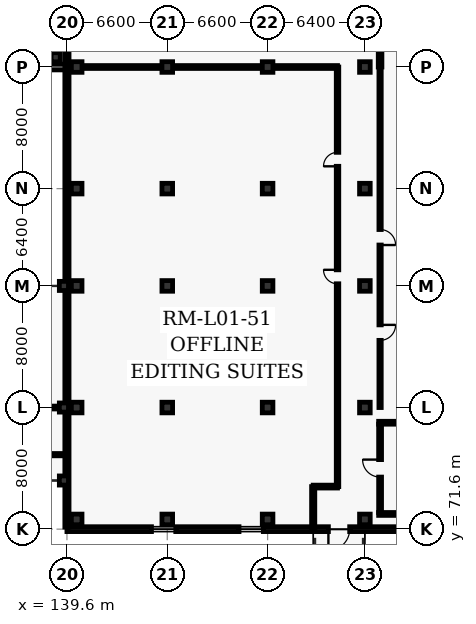
"""IFC4 building model, lengths in metres.
Left out: names, types, materials, properties, quantities, classifications, styles, units other than length and angle.
Written with IfcOpenShell. Run it as: python <this file> out.ifc"""

import sys

from ifc_helpers import new_model, si_unit, direction, frame, frame_2d, origin, origin_2d, place, context, subcontext, project, spatial, rectangle, extrude, element, fill, save


model = new_model("IFC4")
c1 = context("Model", 3, precision=1e-05, world=origin(), true_north=direction((0.0, 1.0)))
c2 = subcontext(c1, "Body", "Model", "MODEL_VIEW")
j1 = project(units=[si_unit("LENGTHUNIT", "METRE"), si_unit("PLANEANGLEUNIT", "RADIAN")], contexts=[c1])
p1 = place(None, origin())
s1 = spatial("IfcSite", under=j1, at=p1, CompositionType="ELEMENT")
p2 = place(p1, origin())
s2 = spatial("IfcBuilding", under=s1, at=p2, CompositionType="ELEMENT")
p3 = place(p2, frame((0.0, 0.0, 5.4)))
s3 = spatial("IfcBuildingStorey", under=s2, at=p3, CompositionType="ELEMENT", Elevation=5.4)
for number, where, z_axis, x_axis in (
    (1, (138.86, 102.64, 0.0), (0.0, 0.0, 1.0), (1.0, 0.0, 0.0)),
    (2, (139.4, 74.8, 0.0), (0.0, 0.0, 1.0), (1.0, 0.0, 0.0)),
    (3, (139.4, 79.6, 0.0), (0.0, 0.0, 1.0), (1.0, 0.0, 0.0)),
    (4, (139.4, 87.6, 0.0), (0.0, 0.0, 1.0), (1.0, 0.0, 0.0)),
):
    element("IfcColumn", number, at=place(p3, frame(where, z_axis=z_axis, x_axis=x_axis)), inside=s3, PredefinedType="COLUMN", context=c2, shape_type="SweptSolid", body=[
        extrude(rectangle(XDim=0.6, YDim=0.6, at=origin_2d()), origin(), (0.0, 0.0, 1.0), 4.8),
    ])
for number, where, z_axis, x_axis in (
    (5, (140.24, 72.24, 0.0), (0.0, 0.0, 1.0), (1.0, 0.0, 0.0)),
    (6, (140.24, 79.6, 0.0), (0.0, 0.0, 1.0), (1.0, 0.0, 0.0)),
    (7, (140.24, 87.6, 0.0), (0.0, 0.0, 1.0), (1.0, 0.0, 0.0)),
    (8, (140.24, 94.0, 0.0), (0.0, 0.0, 1.0), (1.0, 0.0, 0.0)),
    (9, (140.24, 102.0, 0.0), (0.0, 0.0, 1.0), (1.0, 0.0, 0.0)),
    (10, (146.2, 72.24, 0.0), (0.0, 0.0, 1.0), (1.0, 0.0, 0.0)),
    (11, (146.2, 79.6, 0.0), (0.0, 0.0, 1.0), (1.0, 0.0, 0.0)),
    (12, (146.2, 87.6, 0.0), (0.0, 0.0, 1.0), (1.0, 0.0, 0.0)),
    (13, (146.2, 94.0, 0.0), (0.0, 0.0, 1.0), (1.0, 0.0, 0.0)),
    (14, (146.2, 102.0, 0.0), (0.0, 0.0, 1.0), (1.0, 0.0, 0.0)),
    (15, (152.8, 72.24, 0.0), (0.0, 0.0, 1.0), (1.0, 0.0, 0.0)),
    (16, (152.8, 79.6, 0.0), (0.0, 0.0, 1.0), (1.0, 0.0, 0.0)),
    (17, (152.8, 87.6, 0.0), (0.0, 0.0, 1.0), (1.0, 0.0, 0.0)),
    (18, (152.8, 94.0, 0.0), (0.0, 0.0, 1.0), (1.0, 0.0, 0.0)),
    (19, (152.8, 102.0, 0.0), (0.0, 0.0, 1.0), (1.0, 0.0, 0.0)),
    (20, (159.2, 72.24, 0.0), (0.0, 0.0, 1.0), (1.0, 0.0, 0.0)),
    (21, (159.2, 79.6, 0.0), (0.0, 0.0, 1.0), (1.0, 0.0, 0.0)),
    (22, (159.2, 87.6, 0.0), (0.0, 0.0, 1.0), (1.0, 0.0, 0.0)),
    (23, (159.2, 94.0, 0.0), (0.0, 0.0, 1.0), (1.0, 0.0, 0.0)),
    (24, (159.2, 102.0, 0.0), (0.0, 0.0, 1.0), (1.0, 0.0, 0.0)),
):
    element("IfcColumn", number, at=place(p3, frame(where, z_axis=z_axis, x_axis=x_axis)), inside=s3, PredefinedType="COLUMN", context=c2, shape_type="SweptSolid", body=[
        extrude(rectangle(XDim=0.7, YDim=0.7, at=origin_2d()), origin(), (0.0, 0.0, 1.0), 4.8),
    ])
p4 = place(p3, frame((139.5, 102.0, 0.0), z_axis=(0.0, 0.0, 1.0), x_axis=(-1.0, 0.0, 0.0)))
e25 = element("IfcWall", 25, at=p4, inside=s3, PredefinedType="SOLIDWALL", context=c2, shape_type="SweptSolid", body=[
    extrude(rectangle(XDim=44.7, YDim=0.38, at=frame_2d((22.35, 0.0))), origin(), (0.0, 0.0, 1.0), 4.54),
])
p5 = place(p4, frame((2.2, 0.0, 0.9)))
e26 = element("IfcOpeningElement", 26, at=p5, cuts=e25, PredefinedType="OPENING", context=c2, shape_type="SweptSolid", body=[
    extrude(rectangle(XDim=2.6, YDim=2.35, at=frame_2d((1.3, 1.175))), frame((0.0, 0.2, 0.0), z_axis=(0.0, -1.0, 0.0), x_axis=(1.0, 0.0, 0.0)), (0.0, 0.0, 1.0), 0.4),
])
p6 = place(p4, frame((9.05, 0.0, 0.9)))
e27 = element("IfcOpeningElement", 27, at=p6, cuts=e25, PredefinedType="OPENING", context=c2, shape_type="SweptSolid", body=[
    extrude(rectangle(XDim=2.7, YDim=2.35, at=frame_2d((1.35, 1.175))), frame((0.0, 0.2, 0.0), z_axis=(0.0, -1.0, 0.0), x_axis=(1.0, 0.0, 0.0)), (0.0, 0.0, 1.0), 0.4),
])
p7 = place(p4, frame((15.9, 0.0, 0.9)))
e28 = element("IfcOpeningElement", 28, at=p7, cuts=e25, PredefinedType="OPENING", context=c2, shape_type="SweptSolid", body=[
    extrude(rectangle(XDim=2.8, YDim=2.4, at=frame_2d((1.4, 1.2))), frame((0.0, 0.2, 0.0), z_axis=(0.0, -1.0, 0.0), x_axis=(1.0, 0.0, 0.0)), (0.0, 0.0, 1.0), 0.4),
])
p8 = place(p4, frame((22.75, 0.0, 0.9)))
e29 = element("IfcOpeningElement", 29, at=p8, cuts=e25, PredefinedType="OPENING", context=c2, shape_type="SweptSolid", body=[
    extrude(rectangle(XDim=2.9, YDim=2.4, at=frame_2d((1.45, 1.2))), frame((0.0, 0.2, 0.0), z_axis=(0.0, -1.0, 0.0), x_axis=(1.0, 0.0, 0.0)), (0.0, 0.0, 1.0), 0.4),
])
p9 = place(p4, frame((29.6, 0.0, 0.9)))
e30 = element("IfcOpeningElement", 30, at=p9, cuts=e25, PredefinedType="OPENING", context=c2, shape_type="SweptSolid", body=[
    extrude(rectangle(XDim=3.0, YDim=2.45, at=frame_2d((1.5, 1.225))), frame((0.0, 0.2, 0.0), z_axis=(0.0, -1.0, 0.0), x_axis=(1.0, 0.0, 0.0)), (0.0, 0.0, 1.0), 0.4),
])
p10 = place(p4, frame((36.45, 0.0, 0.9)))
e31 = element("IfcOpeningElement", 31, at=p10, cuts=e25, PredefinedType="OPENING", context=c2, shape_type="SweptSolid", body=[
    extrude(rectangle(XDim=3.1, YDim=2.45, at=frame_2d((1.55, 1.225))), frame((0.0, 0.2, 0.0), z_axis=(0.0, -1.0, 0.0), x_axis=(1.0, 0.0, 0.0)), (0.0, 0.0, 1.0), 0.4),
])
p11 = place(p3, frame((172.0, 71.6, 0.0), z_axis=(0.0, 0.0, 1.0), x_axis=(-1.0, 0.0, 0.0)))
e32 = element("IfcWall", 32, at=p11, inside=s3, PredefinedType="SOLIDWALL", context=c2, shape_type="SweptSolid", body=[
    extrude(rectangle(XDim=32.4, YDim=0.32, at=frame_2d((16.2, 0.0))), origin(), (0.0, 0.0, 1.0), 3.85),
])
p12 = place(p11, frame((7.96, 0.0, 0.8)))
e33 = element("IfcOpeningElement", 33, at=p12, cuts=e32, PredefinedType="OPENING", context=c2, shape_type="SweptSolid", body=[
    extrude(rectangle(XDim=1.6, YDim=1.65, at=frame_2d((0.8, 0.825))), frame((0.0, 0.17, 0.0), z_axis=(0.0, -1.0, 0.0), x_axis=(1.0, 0.0, 0.0)), (0.0, 0.0, 1.0), 0.34),
])
p13 = place(p11, frame((19.48, 0.0, 0.8)))
e34 = element("IfcOpeningElement", 34, at=p13, cuts=e32, PredefinedType="OPENING", context=c2, shape_type="SweptSolid", body=[
    extrude(rectangle(XDim=1.6, YDim=1.65, at=frame_2d((0.8, 0.825))), frame((0.0, 0.17, 0.0), z_axis=(0.0, -1.0, 0.0), x_axis=(1.0, 0.0, 0.0)), (0.0, 0.0, 1.0), 0.34),
])
p14 = place(p11, frame((25.24, 0.0, 0.8)))
e35 = element("IfcOpeningElement", 35, at=p14, cuts=e32, PredefinedType="OPENING", context=c2, shape_type="SweptSolid", body=[
    extrude(rectangle(XDim=1.6, YDim=1.65, at=frame_2d((0.8, 0.825))), frame((0.0, 0.17, 0.0), z_axis=(0.0, -1.0, 0.0), x_axis=(1.0, 0.0, 0.0)), (0.0, 0.0, 1.0), 0.34),
])
p15 = place(p11, frame((13.8, 0.0, 0.0)))
e36 = element("IfcOpeningElement", 36, at=p15, cuts=e32, PredefinedType="OPENING", context=c2, shape_type="SweptSolid", body=[
    extrude(rectangle(XDim=1.4, YDim=2.25, at=frame_2d((0.7, 1.125))), frame((0.0, 0.17, 0.0), z_axis=(0.0, -1.0, 0.0), x_axis=(1.0, 0.0, 0.0)), (0.0, 0.0, 1.0), 0.34),
])
p16 = place(p3, frame((139.6, 71.74, 0.0), z_axis=(0.0, 0.0, 1.0), x_axis=(0.0, 1.0, 0.0)))
e37 = element("IfcWall", 37, at=p16, inside=s3, PredefinedType="SOLIDWALL", context=c2, shape_type="SweptSolid", body=[
    extrude(rectangle(XDim=46.12, YDim=0.275, at=frame_2d((23.06, 0.0))), origin(), (0.0, 0.0, 1.0), 3.69),
])
p17 = place(p16, frame((31.38, 0.0, 0.0)))
e38 = element("IfcOpeningElement", 38, at=p17, cuts=e37, PredefinedType="OPENING", context=c2, shape_type="SweptSolid", body=[
    extrude(rectangle(XDim=1.4, YDim=2.25, at=frame_2d((0.7, 1.125))), frame((0.0, 0.147, 0.0), z_axis=(0.0, -1.0, 0.0), x_axis=(1.0, 0.0, 0.0)), (0.0, 0.0, 1.0), 0.295),
])
p18 = place(p3, frame((160.105, 72.6, 0.0), z_axis=(0.0, 0.0, 1.0), x_axis=(1.0, 0.0, 0.0)))
e39 = element("IfcWall", 39, at=p18, inside=s3, PredefinedType="PARTITIONING", context=c2, shape_type="SweptSolid", body=[
    extrude(rectangle(XDim=4.143, YDim=0.19, at=frame_2d((2.072, 0.0))), origin(), (0.0, 0.0, 1.0), 3.9),
])
p19 = place(p3, frame((160.105, 78.6, 0.0), z_axis=(0.0, 0.0, 1.0), x_axis=(1.0, 0.0, 0.0)))
e40 = element("IfcWall", 40, at=p19, inside=s3, PredefinedType="PARTITIONING", context=c2, shape_type="SweptSolid", body=[
    extrude(rectangle(XDim=4.495, YDim=0.19, at=frame_2d((2.248, 0.0))), origin(), (0.0, 0.0, 1.0), 4.55),
])
p20 = place(p3, frame((160.2, 72.695, 0.0), z_axis=(0.0, 0.0, 1.0), x_axis=(0.0, 1.0, 0.0)))
e41 = element("IfcWall", 41, at=p20, inside=s3, PredefinedType="PARTITIONING", context=c2, shape_type="SweptSolid", body=[
    extrude(rectangle(XDim=5.81, YDim=0.19, at=frame_2d((2.905, 0.0))), origin(), (0.0, 0.0, 1.0), 4.55),
])
p21 = place(p20, frame((2.33, 0.0, 0.0)))
e42 = element("IfcOpeningElement", 42, at=p21, cuts=e41, PredefinedType="OPENING", context=c2, shape_type="SweptSolid", body=[
    extrude(rectangle(XDim=1.15, YDim=2.2, at=frame_2d((0.575, 1.1))), frame((0.0, 0.105, 0.0), z_axis=(0.0, -1.0, 0.0), x_axis=(1.0, 0.0, 0.0)), (0.0, 0.0, 1.0), 0.21),
])
p22 = place(p3, frame((139.4, 76.5, 0.0), z_axis=(0.0, 0.0, 1.0), x_axis=(-1.0, 0.0, 0.0)))
e43 = element("IfcWall", 43, at=p22, inside=s3, PredefinedType="PARTITIONING", context=c2, shape_type="SweptSolid", body=[
    extrude(rectangle(XDim=44.6, YDim=0.15, at=frame_2d((22.3, 0.0))), origin(), (0.0, 0.0, 1.0), 4.54),
])
p23 = place(p22, frame((21.5, 0.0, 0.0)))
e44 = element("IfcOpeningElement", 44, at=p23, cuts=e43, PredefinedType="OPENING", context=c2, shape_type="SweptSolid", body=[
    extrude(rectangle(XDim=1.6, YDim=2.3, at=frame_2d((0.8, 1.15))), frame((0.0, 0.085, 0.0), z_axis=(0.0, -1.0, 0.0), x_axis=(1.0, 0.0, 0.0)), (0.0, 0.0, 1.0), 0.17),
])
p24 = place(p3, frame((95.102, 79.6, 0.0), z_axis=(0.0, 0.0, 1.0), x_axis=(1.0, 0.0, 0.0)))
e45 = element("IfcWall", 45, at=p24, inside=s3, PredefinedType="PARTITIONING", context=c2, shape_type="SweptSolid", body=[
    extrude(rectangle(XDim=43.996, YDim=0.19, at=frame_2d((21.998, 0.0))), origin(), (0.0, 0.0, 1.0), 3.89),
])
p25 = place(p24, frame((21.523, 0.0, 0.0)))
e46 = element("IfcOpeningElement", 46, at=p25, cuts=e45, PredefinedType="OPENING", context=c2, shape_type="SweptSolid", body=[
    extrude(rectangle(XDim=0.95, YDim=2.1, at=frame_2d((0.475, 1.05))), frame((0.0, 0.105, 0.0), z_axis=(0.0, -1.0, 0.0), x_axis=(1.0, 0.0, 0.0)), (0.0, 0.0, 1.0), 0.21),
])
p26 = place(p24, frame((33.617, 0.0, 0.0)))
e47 = element("IfcOpeningElement", 47, at=p26, cuts=e45, PredefinedType="OPENING", context=c2, shape_type="SweptSolid", body=[
    extrude(rectangle(XDim=1.4, YDim=2.25, at=frame_2d((0.7, 1.125))), frame((0.0, 0.105, 0.0), z_axis=(0.0, -1.0, 0.0), x_axis=(1.0, 0.0, 0.0)), (0.0, 0.0, 1.0), 0.21),
])
p27 = place(p3, frame((157.4, 102.0, 0.0), z_axis=(0.0, 0.0, 1.0), x_axis=(-1.0, 0.0, 0.0)))
e48 = element("IfcWall", 48, at=p27, inside=s3, PredefinedType="PARTITIONING", context=c2, shape_type="SweptSolid", body=[
    extrude(rectangle(XDim=17.8, YDim=0.19, at=frame_2d((8.9, 0.0))), origin(), (0.0, 0.0, 1.0), 3.9),
])
p28 = place(p3, frame((160.2, 110.0, 0.0), z_axis=(0.0, 0.0, 1.0), x_axis=(0.0, -1.0, 0.0)))
e49 = element("IfcWall", 49, at=p28, inside=s3, PredefinedType="PARTITIONING", context=c2, shape_type="SweptSolid", body=[
    extrude(rectangle(XDim=8.0, YDim=0.24, at=frame_2d((4.0, 0.0))), origin(), (0.0, 0.0, 1.0), 4.55),
])
p29 = place(p3, frame((155.8, 71.6, 0.0), z_axis=(0.0, 0.0, 1.0), x_axis=(0.0, 1.0, 0.0)))
e50 = element("IfcWall", 50, at=p29, inside=s3, PredefinedType="PARTITIONING", context=c2, shape_type="SweptSolid", body=[
    extrude(rectangle(XDim=2.8, YDim=0.21, at=frame_2d((1.4, 0.0))), origin(), (0.0, 0.0, 1.0), 4.55),
])
p30 = place(p3, frame((155.8, 74.4, 0.0), z_axis=(0.0, 0.0, 1.0), x_axis=(1.0, 0.0, 0.0)))
e51 = element("IfcWall", 51, at=p30, inside=s3, PredefinedType="PARTITIONING", context=c2, shape_type="SweptSolid", body=[
    extrude(rectangle(XDim=1.6, YDim=0.19, at=frame_2d((0.8, 0.0))), origin(), (0.0, 0.0, 1.0), 4.55),
])
p31 = place(p3, frame((157.4, 74.4, 0.0), z_axis=(0.0, 0.0, 1.0), x_axis=(0.0, 1.0, 0.0)))
e52 = element("IfcWall", 52, at=p31, inside=s3, PredefinedType="PARTITIONING", context=c2, shape_type="SweptSolid", body=[
    extrude(rectangle(XDim=27.6, YDim=0.165, at=frame_2d((13.8, 0.0))), origin(), (0.0, 0.0, 1.0), 4.55),
])
p32 = place(p31, frame((13.34, 0.0, 0.0)))
e53 = element("IfcOpeningElement", 53, at=p32, cuts=e52, PredefinedType="OPENING", context=c2, shape_type="SweptSolid", body=[
    extrude(rectangle(XDim=0.92, YDim=2.1, at=frame_2d((0.46, 1.05))), frame((0.0, 0.093, 0.0), z_axis=(0.0, -1.0, 0.0), x_axis=(1.0, 0.0, 0.0)), (0.0, 0.0, 1.0), 0.185),
])
p33 = place(p31, frame((21.068, 0.0, 0.0)))
e54 = element("IfcOpeningElement", 54, at=p33, cuts=e52, PredefinedType="OPENING", context=c2, shape_type="SweptSolid", body=[
    extrude(rectangle(XDim=0.92, YDim=2.1, at=frame_2d((0.46, 1.05))), frame((0.0, 0.093, 0.0), z_axis=(0.0, -1.0, 0.0), x_axis=(1.0, 0.0, 0.0)), (0.0, 0.0, 1.0), 0.185),
])
p34 = place(p3, frame((160.2, 102.0, 0.0), z_axis=(0.0, 0.0, 1.0), x_axis=(0.0, -1.0, 0.0)))
e55 = element("IfcWall", 55, at=p34, inside=s3, PredefinedType="PARTITIONING", context=c2, shape_type="SweptSolid", body=[
    extrude(rectangle(XDim=22.4, YDim=0.15, at=frame_2d((11.2, 0.0))), origin(), (0.0, 0.0, 1.0), 4.55),
])
p35 = place(p34, frame((10.69, 0.0, 0.0)))
e56 = element("IfcOpeningElement", 56, at=p35, cuts=e55, PredefinedType="OPENING", context=c2, shape_type="SweptSolid", body=[
    extrude(rectangle(XDim=1.02, YDim=2.1, at=frame_2d((0.51, 1.05))), frame((0.0, 0.085, 0.0), z_axis=(0.0, -1.0, 0.0), x_axis=(1.0, 0.0, 0.0)), (0.0, 0.0, 1.0), 0.17),
])
p36 = place(p34, frame((16.962, 0.0, 0.0)))
e57 = element("IfcOpeningElement", 57, at=p36, cuts=e55, PredefinedType="OPENING", context=c2, shape_type="SweptSolid", body=[
    extrude(rectangle(XDim=1.02, YDim=2.1, at=frame_2d((0.51, 1.05))), frame((0.0, 0.085, 0.0), z_axis=(0.0, -1.0, 0.0), x_axis=(1.0, 0.0, 0.0)), (0.0, 0.0, 1.0), 0.17),
])
p37 = place(p13, origin())
e58 = element("IfcWindow", 58, at=p37, inside=s3, PartitioningType="SINGLE_PANEL", PredefinedType="WINDOW", context=c2, shape_type="SweptSolid", body=[
    extrude(rectangle(XDim=1.6, YDim=1.65, at=frame_2d((0.8, 0.825))), frame((0.0, 0.03, 0.0), z_axis=(0.0, -1.0, 0.0), x_axis=(1.0, 0.0, 0.0)), (0.0, 0.0, 1.0), 0.06),
])
fill(e34, e58)
p38 = place(p14, origin())
e59 = element("IfcWindow", 59, at=p38, inside=s3, PartitioningType="SINGLE_PANEL", PredefinedType="WINDOW", context=c2, shape_type="SweptSolid", body=[
    extrude(rectangle(XDim=1.6, YDim=1.65, at=frame_2d((0.8, 0.825))), frame((0.0, 0.03, 0.0), z_axis=(0.0, -1.0, 0.0), x_axis=(1.0, 0.0, 0.0)), (0.0, 0.0, 1.0), 0.06),
])
fill(e35, e59)
p39 = place(p21, origin())
e60 = element("IfcDoor", 60, at=p39, inside=s3, OperationType="SINGLE_SWING_RIGHT", PredefinedType="DOOR", context=c2, shape_type="SweptSolid", body=[
    extrude(rectangle(XDim=1.15, YDim=2.2, at=frame_2d((0.575, 1.1))), frame((0.0, 0.025, 0.0), z_axis=(0.0, -1.0, 0.0), x_axis=(1.0, 0.0, 0.0)), (0.0, 0.0, 1.0), 0.05),
])
fill(e42, e60)
p40 = place(p15, origin())
e61 = element("IfcDoor", 61, at=p40, inside=s3, OperationType="SINGLE_SWING_RIGHT", PredefinedType="DOOR", context=c2, shape_type="SweptSolid", body=[
    extrude(rectangle(XDim=1.4, YDim=2.25, at=frame_2d((0.7, 1.125))), frame((0.0, 0.025, 0.0), z_axis=(0.0, -1.0, 0.0), x_axis=(1.0, 0.0, 0.0)), (0.0, 0.0, 1.0), 0.05),
])
fill(e36, e61)
p41 = place(p32, origin())
e62 = element("IfcDoor", 62, at=p41, inside=s3, OperationType="SINGLE_SWING_RIGHT", PredefinedType="DOOR", context=c2, shape_type="SweptSolid", body=[
    extrude(rectangle(XDim=0.92, YDim=2.1, at=frame_2d((0.46, 1.05))), frame((0.0, 0.025, 0.0), z_axis=(0.0, -1.0, 0.0), x_axis=(1.0, 0.0, 0.0)), (0.0, 0.0, 1.0), 0.05),
])
fill(e53, e62)
p42 = place(p33, origin())
e63 = element("IfcDoor", 63, at=p42, inside=s3, OperationType="SINGLE_SWING_LEFT", PredefinedType="DOOR", context=c2, shape_type="SweptSolid", body=[
    extrude(rectangle(XDim=0.92, YDim=2.1, at=frame_2d((0.46, 1.05))), frame((0.0, 0.025, 0.0), z_axis=(0.0, -1.0, 0.0), x_axis=(1.0, 0.0, 0.0)), (0.0, 0.0, 1.0), 0.05),
])
fill(e54, e63)
p43 = place(p35, origin())
e64 = element("IfcDoor", 64, at=p43, inside=s3, OperationType="SINGLE_SWING_RIGHT", PredefinedType="DOOR", context=c2, shape_type="SweptSolid", body=[
    extrude(rectangle(XDim=1.02, YDim=2.1, at=frame_2d((0.51, 1.05))), frame((0.0, 0.025, 0.0), z_axis=(0.0, -1.0, 0.0), x_axis=(1.0, 0.0, 0.0)), (0.0, 0.0, 1.0), 0.05),
])
fill(e56, e64)
p44 = place(p36, origin())
e65 = element("IfcDoor", 65, at=p44, inside=s3, OperationType="SINGLE_SWING_LEFT", PredefinedType="DOOR", context=c2, shape_type="SweptSolid", body=[
    extrude(rectangle(XDim=1.02, YDim=2.1, at=frame_2d((0.51, 1.05))), frame((0.0, 0.025, 0.0), z_axis=(0.0, -1.0, 0.0), x_axis=(1.0, 0.0, 0.0)), (0.0, 0.0, 1.0), 0.05),
])
fill(e57, e65)
save(model, sys.argv[1])
